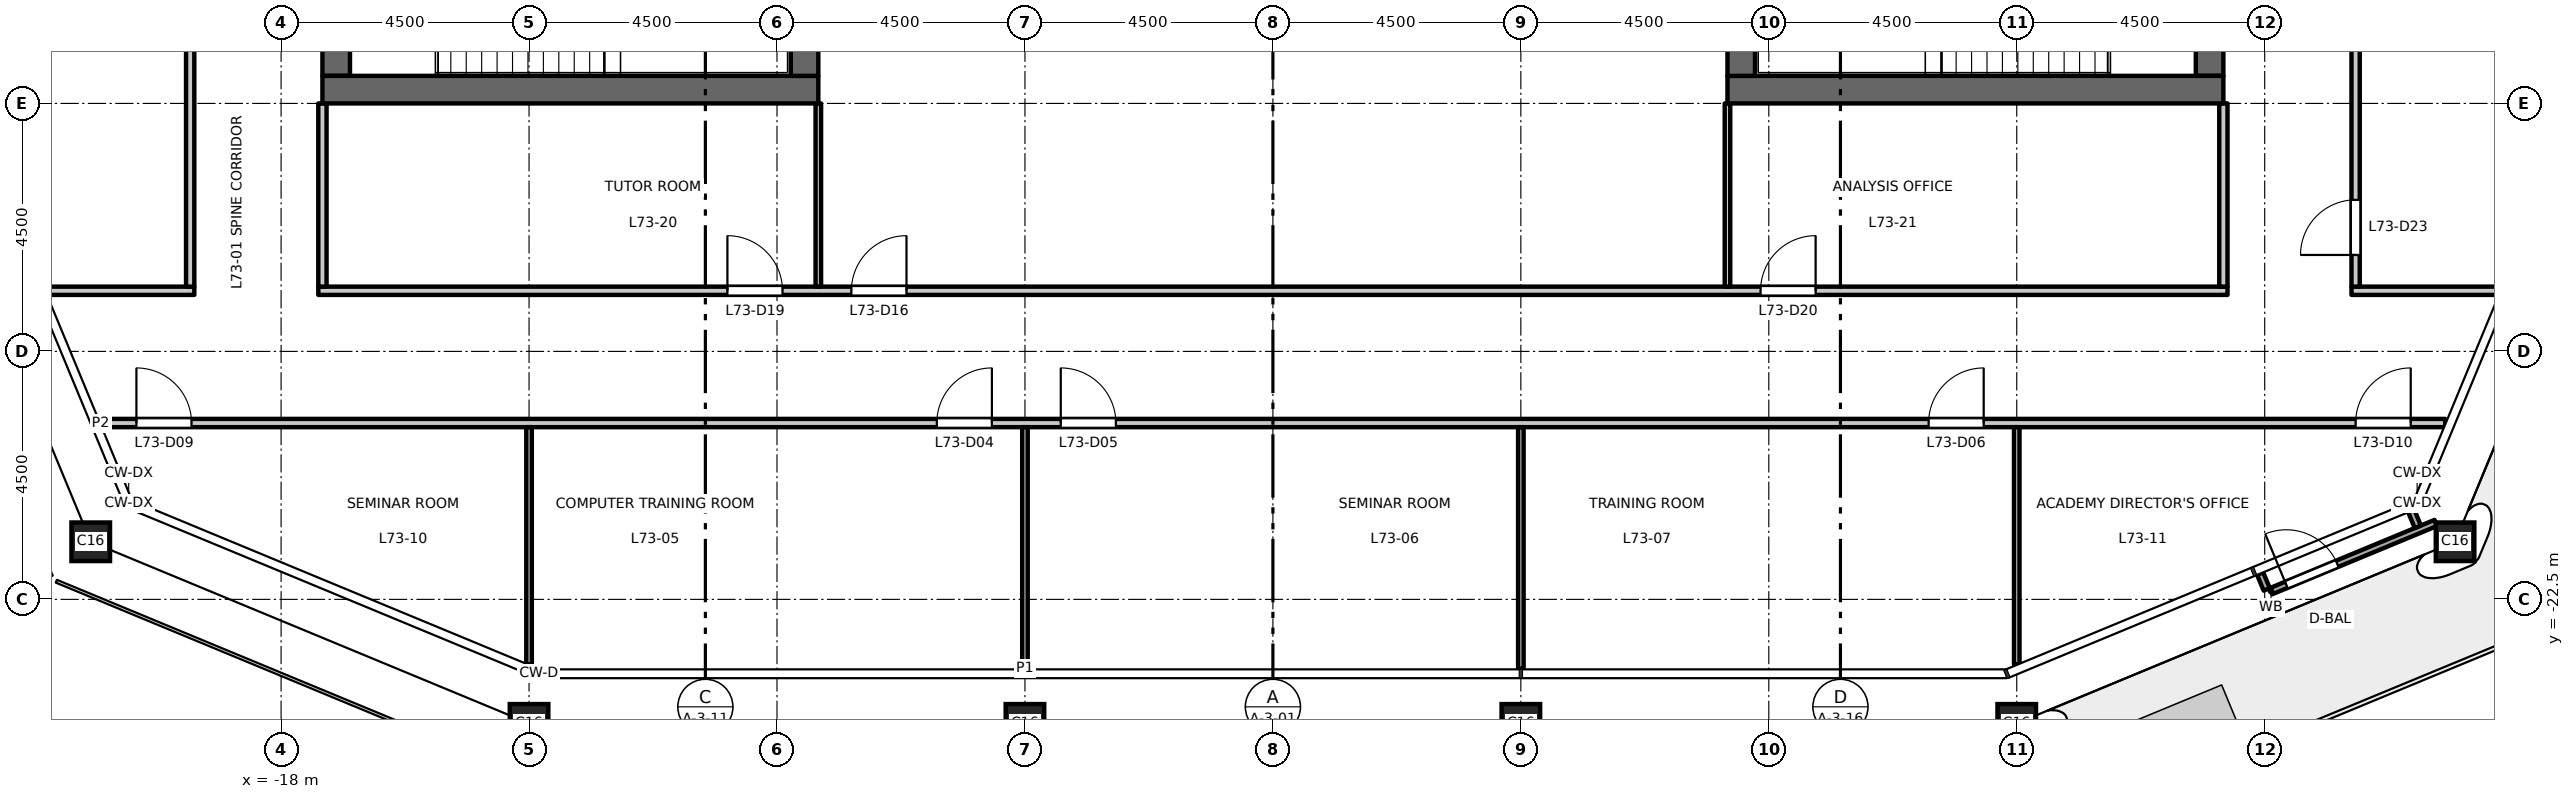
"""IFC4 building model, lengths in metres.
Left out: names, types, materials, properties, quantities, classifications, styles, units other than length and angle.
Written with IfcOpenShell. Run it as: python <this file> out.ifc"""

import sys

from ifc_helpers import new_model, si_unit, direction, frame, frame_2d, origin, origin_2d, place, context, subcontext, project, spatial, rectangle, hollow_rectangle, extrude, element, fill, save


model = new_model("IFC4")
c1 = context("Model", 3, precision=1e-05, world=origin(), true_north=direction((0.0, 1.0)))
c2 = subcontext(c1, "Body", "Model", "MODEL_VIEW")
j1 = project(units=[si_unit("LENGTHUNIT", "METRE"), si_unit("PLANEANGLEUNIT", "RADIAN")], contexts=[c1])
p1 = place(None, origin())
s1 = spatial("IfcSite", under=j1, at=p1, CompositionType="ELEMENT")
p2 = place(p1, origin())
s2 = spatial("IfcBuilding", under=s1, at=p2, CompositionType="ELEMENT")
p3 = place(p2, frame((0.0, 0.0, 339.2)))
s3 = spatial("IfcBuildingStorey", under=s2, at=p3, CompositionType="ELEMENT", Elevation=339.2)
for number, where, z_axis, x_axis in (
    (1, (-13.5, -24.75, 0.0), (0.0, 0.0, 1.0), (1.0, 0.0, 0.0)),
    (2, (-4.5, -24.75, 0.0), (0.0, 0.0, 1.0), (1.0, 0.0, 0.0)),
    (3, (4.5, -24.75, 0.0), (0.0, 0.0, 1.0), (1.0, 0.0, 0.0)),
    (4, (13.5, -24.75, 0.0), (0.0, 0.0, 1.0), (1.0, 0.0, 0.0)),
    (5, (21.455, -21.455, 0.0), (0.0, 0.0, 1.0), (1.0, 0.0, 0.0)),
    (6, (-21.455, -21.455, 0.0), (0.0, 0.0, 1.0), (1.0, 0.0, 0.0)),
):
    element("IfcColumn", number, at=place(p3, frame(where, z_axis=z_axis, x_axis=x_axis)), inside=s3, PredefinedType="COLUMN", context=c2, shape_type="SweptSolid", body=[
        extrude(hollow_rectangle(XDim=0.7, YDim=0.7, WallThickness=0.036, at=origin_2d()), origin(), (0.0, 0.0, 1.0), 4.5),
    ])
p4 = place(p3, frame((-17.0, -13.0, 0.0), z_axis=(0.0, 0.0, 1.0), x_axis=(0.0, 1.0, 0.0)))
e7 = element("IfcWall", 7, at=p4, inside=s3, PredefinedType="SHEAR", context=c2, shape_type="SweptSolid", body=[
    extrude(rectangle(XDim=26.0, YDim=0.5, at=frame_2d((13.0, 0.0))), origin(), (0.0, 0.0, 1.0), 4.35),
])
p5 = place(p4, frame((16.825, 0.0, 0.0)))
e8 = element("IfcOpeningElement", 8, at=p5, cuts=e7, PredefinedType="OPENING", context=c2, shape_type="SweptSolid", body=[
    extrude(rectangle(XDim=1.8, YDim=2.1, at=frame_2d((0.9, 1.05))), frame((0.0, 0.26, 0.0), z_axis=(0.0, -1.0, 0.0), x_axis=(1.0, 0.0, 0.0)), (0.0, 0.0, 1.0), 0.52),
])
p6 = place(p4, frame((7.375, 0.0, 0.0)))
e9 = element("IfcOpeningElement", 9, at=p6, cuts=e7, PredefinedType="OPENING", context=c2, shape_type="SweptSolid", body=[
    extrude(rectangle(XDim=1.8, YDim=2.1, at=frame_2d((0.9, 1.05))), frame((0.0, 0.26, 0.0), z_axis=(0.0, -1.0, 0.0), x_axis=(1.0, 0.0, 0.0)), (0.0, 0.0, 1.0), 0.52),
])
p7 = place(p3, frame((-8.25, -13.25, 0.0), z_axis=(0.0, 0.0, 1.0), x_axis=(-1.0, 0.0, 0.0)))
e10 = element("IfcWall", 10, at=p7, inside=s3, PredefinedType="SHEAR", context=c2, shape_type="SweptSolid", body=[
    extrude(rectangle(XDim=9.0, YDim=0.5, at=frame_2d((4.5, 0.0))), origin(), (0.0, 0.0, 1.0), 4.35),
])
p8 = place(p3, frame((-8.5, -13.0, 0.0), z_axis=(0.0, 0.0, 1.0), x_axis=(0.0, 1.0, 0.0)))
e11 = element("IfcWall", 11, at=p8, inside=s3, PredefinedType="SHEAR", context=c2, shape_type="SweptSolid", body=[
    extrude(rectangle(XDim=26.0, YDim=0.5, at=frame_2d((13.0, 0.0))), origin(), (0.0, 0.0, 1.0), 4.35),
])
p9 = place(p3, frame((17.0, -13.0, 0.0), z_axis=(0.0, 0.0, 1.0), x_axis=(0.0, 1.0, 0.0)))
e12 = element("IfcWall", 12, at=p9, inside=s3, PredefinedType="SHEAR", context=c2, shape_type="SweptSolid", body=[
    extrude(rectangle(XDim=26.0, YDim=0.5, at=frame_2d((13.0, 0.0))), origin(), (0.0, 0.0, 1.0), 4.35),
])
p10 = place(p9, frame((16.825, 0.0, 0.0)))
e13 = element("IfcOpeningElement", 13, at=p10, cuts=e12, PredefinedType="OPENING", context=c2, shape_type="SweptSolid", body=[
    extrude(rectangle(XDim=1.8, YDim=2.1, at=frame_2d((0.9, 1.05))), frame((0.0, 0.26, 0.0), z_axis=(0.0, -1.0, 0.0), x_axis=(1.0, 0.0, 0.0)), (0.0, 0.0, 1.0), 0.52),
])
p11 = place(p9, frame((7.375, 0.0, 0.0)))
e14 = element("IfcOpeningElement", 14, at=p11, cuts=e12, PredefinedType="OPENING", context=c2, shape_type="SweptSolid", body=[
    extrude(rectangle(XDim=1.8, YDim=2.1, at=frame_2d((0.9, 1.05))), frame((0.0, 0.26, 0.0), z_axis=(0.0, -1.0, 0.0), x_axis=(1.0, 0.0, 0.0)), (0.0, 0.0, 1.0), 0.52),
])
p12 = place(p3, frame((8.25, -13.25, 0.0), z_axis=(0.0, 0.0, 1.0), x_axis=(1.0, 0.0, 0.0)))
e15 = element("IfcWall", 15, at=p12, inside=s3, PredefinedType="SHEAR", context=c2, shape_type="SweptSolid", body=[
    extrude(rectangle(XDim=9.0, YDim=0.5, at=frame_2d((4.5, 0.0))), origin(), (0.0, 0.0, 1.0), 4.35),
])
p13 = place(p3, frame((8.5, -13.0, 0.0), z_axis=(0.0, 0.0, 1.0), x_axis=(0.0, 1.0, 0.0)))
e16 = element("IfcWall", 16, at=p13, inside=s3, PredefinedType="SHEAR", context=c2, shape_type="SweptSolid", body=[
    extrude(rectangle(XDim=26.0, YDim=0.5, at=frame_2d((13.0, 0.0))), origin(), (0.0, 0.0, 1.0), 4.35),
])
p14 = place(p3, frame((17.917, -22.033, 0.0), z_axis=(0.0, 0.0, 1.0), x_axis=(0.382769136873, -0.923844027884, 0.0)))
e17 = element("IfcWall", 17, at=p14, inside=s3, PredefinedType="STANDARD", context=c2, shape_type="SweptSolid", body=[
    extrude(rectangle(XDim=0.31, YDim=0.12, at=frame_2d((0.155, 0.0))), origin(), (0.0, 0.0, 1.0), 4.35),
])
p15 = place(p3, frame((20.66, -20.896, 0.0), z_axis=(0.0, 0.0, 1.0), x_axis=(0.382490814953, -0.923959293734, 0.0)))
e18 = element("IfcWall", 18, at=p15, inside=s3, PredefinedType="STANDARD", context=c2, shape_type="SweptSolid", body=[
    extrude(rectangle(XDim=0.31, YDim=0.12, at=frame_2d((0.155, 0.0))), origin(), (0.0, 0.0, 1.0), 4.35),
])
p16 = place(p3, frame((18.115, -22.352, 0.0), z_axis=(0.0, 0.0, 1.0), x_axis=(0.923871583709, 0.382702621907, 0.0)))
e19 = element("IfcWall", 19, at=p16, inside=s3, PredefinedType="STANDARD", context=c2, shape_type="SweptSolid", body=[
    extrude(rectangle(XDim=3.237, YDim=0.12, at=frame_2d((1.618, 0.0))), origin(), (0.0, 0.0, 1.0), 4.35),
])
p17 = place(p16, frame((0.3, 0.0, 0.0)))
e20 = element("IfcOpeningElement", 20, at=p17, cuts=e19, PredefinedType="OPENING", context=c2, shape_type="SweptSolid", body=[
    extrude(rectangle(XDim=1.0, YDim=2.4, at=frame_2d((0.5, 1.2))), frame((0.0, 0.07, 0.0), z_axis=(0.0, -1.0, 0.0), x_axis=(1.0, 0.0, 0.0)), (0.0, 0.0, 1.0), 0.14),
])
p18 = place(p3, frame((-21.276, -19.3, 0.0), z_axis=(0.0, 0.0, 1.0), x_axis=(1.0, 0.0, 0.0)))
e21 = element("IfcWall", 21, at=p18, inside=s3, PredefinedType="PARTITIONING", context=c2, shape_type="SweptSolid", body=[
    extrude(rectangle(XDim=42.552, YDim=0.15, at=frame_2d((21.276, 0.0))), origin(), (0.0, 0.0, 1.0), 4.35),
])
p19 = place(p18, frame((15.176, 0.0, 0.0)))
e22 = element("IfcOpeningElement", 22, at=p19, cuts=e21, PredefinedType="OPENING", context=c2, shape_type="SweptSolid", body=[
    extrude(rectangle(XDim=1.0, YDim=2.1, at=frame_2d((0.5, 1.05))), frame((0.0, 0.085, 0.0), z_axis=(0.0, -1.0, 0.0), x_axis=(1.0, 0.0, 0.0)), (0.0, 0.0, 1.0), 0.17),
])
p20 = place(p18, frame((17.426, 0.0, 0.0)))
e23 = element("IfcOpeningElement", 23, at=p20, cuts=e21, PredefinedType="OPENING", context=c2, shape_type="SweptSolid", body=[
    extrude(rectangle(XDim=1.0, YDim=2.1, at=frame_2d((0.5, 1.05))), frame((0.0, 0.085, 0.0), z_axis=(0.0, -1.0, 0.0), x_axis=(1.0, 0.0, 0.0)), (0.0, 0.0, 1.0), 0.17),
])
p21 = place(p18, frame((33.176, 0.0, 0.0)))
e24 = element("IfcOpeningElement", 24, at=p21, cuts=e21, PredefinedType="OPENING", context=c2, shape_type="SweptSolid", body=[
    extrude(rectangle(XDim=1.0, YDim=2.1, at=frame_2d((0.5, 1.05))), frame((0.0, 0.085, 0.0), z_axis=(0.0, -1.0, 0.0), x_axis=(1.0, 0.0, 0.0)), (0.0, 0.0, 1.0), 0.17),
])
p22 = place(p18, frame((0.65, 0.0, 0.0)))
e25 = element("IfcOpeningElement", 25, at=p22, cuts=e21, PredefinedType="OPENING", context=c2, shape_type="SweptSolid", body=[
    extrude(rectangle(XDim=1.0, YDim=2.1, at=frame_2d((0.5, 1.05))), frame((0.0, 0.085, 0.0), z_axis=(0.0, -1.0, 0.0), x_axis=(1.0, 0.0, 0.0)), (0.0, 0.0, 1.0), 0.17),
])
p23 = place(p18, frame((40.926, 0.0, 0.0)))
e26 = element("IfcOpeningElement", 26, at=p23, cuts=e21, PredefinedType="OPENING", context=c2, shape_type="SweptSolid", body=[
    extrude(rectangle(XDim=1.0, YDim=2.1, at=frame_2d((0.5, 1.05))), frame((0.0, 0.085, 0.0), z_axis=(0.0, -1.0, 0.0), x_axis=(1.0, 0.0, 0.0)), (0.0, 0.0, 1.0), 0.17),
])
p24 = place(p3, frame((-22.27, -16.9, 0.0), z_axis=(0.0, 0.0, 1.0), x_axis=(1.0, 0.0, 0.0)))
e27 = element("IfcWall", 27, at=p24, inside=s3, PredefinedType="PARTITIONING", context=c2, shape_type="SweptSolid", body=[
    extrude(rectangle(XDim=2.695, YDim=0.15, at=frame_2d((1.348, 0.0))), origin(), (0.0, 0.0, 1.0), 4.35),
])
p25 = place(p3, frame((-17.325, -16.9, 0.0), z_axis=(0.0, 0.0, 1.0), x_axis=(1.0, 0.0, 0.0)))
e28 = element("IfcWall", 28, at=p25, inside=s3, PredefinedType="PARTITIONING", context=c2, shape_type="SweptSolid", body=[
    extrude(rectangle(XDim=34.65, YDim=0.15, at=frame_2d((17.325, 0.0))), origin(), (0.0, 0.0, 1.0), 4.35),
])
p26 = place(p25, frame((9.675, 0.0, 0.0)))
e29 = element("IfcOpeningElement", 29, at=p26, cuts=e28, PredefinedType="OPENING", context=c2, shape_type="SweptSolid", body=[
    extrude(rectangle(XDim=1.0, YDim=2.1, at=frame_2d((0.5, 1.05))), frame((0.0, 0.085, 0.0), z_axis=(0.0, -1.0, 0.0), x_axis=(1.0, 0.0, 0.0)), (0.0, 0.0, 1.0), 0.17),
])
p27 = place(p25, frame((7.425, 0.0, 0.0)))
e30 = element("IfcOpeningElement", 30, at=p27, cuts=e28, PredefinedType="OPENING", context=c2, shape_type="SweptSolid", body=[
    extrude(rectangle(XDim=1.0, YDim=2.1, at=frame_2d((0.5, 1.05))), frame((0.0, 0.085, 0.0), z_axis=(0.0, -1.0, 0.0), x_axis=(1.0, 0.0, 0.0)), (0.0, 0.0, 1.0), 0.17),
])
p28 = place(p25, frame((26.175, 0.0, 0.0)))
e31 = element("IfcOpeningElement", 31, at=p28, cuts=e28, PredefinedType="OPENING", context=c2, shape_type="SweptSolid", body=[
    extrude(rectangle(XDim=1.0, YDim=2.1, at=frame_2d((0.5, 1.05))), frame((0.0, 0.085, 0.0), z_axis=(0.0, -1.0, 0.0), x_axis=(1.0, 0.0, 0.0)), (0.0, 0.0, 1.0), 0.17),
])
p29 = place(p3, frame((19.575, -16.9, 0.0), z_axis=(0.0, 0.0, 1.0), x_axis=(1.0, 0.0, 0.0)))
e32 = element("IfcWall", 32, at=p29, inside=s3, PredefinedType="PARTITIONING", context=c2, shape_type="SweptSolid", body=[
    extrude(rectangle(XDim=2.695, YDim=0.15, at=frame_2d((1.348, 0.0))), origin(), (0.0, 0.0, 1.0), 4.35),
])
p30 = place(p3, frame((-19.65, -16.825, 0.0), z_axis=(0.0, 0.0, 1.0), x_axis=(0.0, 1.0, 0.0)))
e33 = element("IfcWall", 33, at=p30, inside=s3, PredefinedType="PARTITIONING", context=c2, shape_type="SweptSolid", body=[
    extrude(rectangle(XDim=33.65, YDim=0.15, at=frame_2d((16.825, 0.0))), origin(), (0.0, 0.0, 1.0), 4.35),
])
p31 = place(p30, frame((32.075, 0.0, 0.0)))
e34 = element("IfcOpeningElement", 34, at=p31, cuts=e33, PredefinedType="OPENING", context=c2, shape_type="SweptSolid", body=[
    extrude(rectangle(XDim=1.0, YDim=2.1, at=frame_2d((0.5, 1.05))), frame((0.0, 0.085, 0.0), z_axis=(0.0, -1.0, 0.0), x_axis=(1.0, 0.0, 0.0)), (0.0, 0.0, 1.0), 0.17),
])
p32 = place(p3, frame((-17.25, -16.825, 0.0), z_axis=(0.0, 0.0, 1.0), x_axis=(0.0, 1.0, 0.0)))
e35 = element("IfcWall", 35, at=p32, inside=s3, PredefinedType="PARTITIONING", context=c2, shape_type="SweptSolid", body=[
    extrude(rectangle(XDim=3.325, YDim=0.15, at=frame_2d((1.663, 0.0))), origin(), (0.0, 0.0, 1.0), 4.35),
])
p33 = place(p3, frame((-13.5, -23.678, 0.0), z_axis=(0.0, 0.0, 1.0), x_axis=(0.0, 1.0, 0.0)))
e36 = element("IfcWall", 36, at=p33, inside=s3, PredefinedType="PARTITIONING", context=c2, shape_type="SweptSolid", body=[
    extrude(rectangle(XDim=4.303, YDim=0.1, at=frame_2d((2.151, 0.0))), origin(), (0.0, 0.0, 1.0), 3.75),
])
p34 = place(p3, frame((-8.25, -16.825, 0.0), z_axis=(0.0, 0.0, 1.0), x_axis=(0.0, 1.0, 0.0)))
e37 = element("IfcWall", 37, at=p34, inside=s3, PredefinedType="PARTITIONING", context=c2, shape_type="SweptSolid", body=[
    extrude(rectangle(XDim=3.325, YDim=0.1, at=frame_2d((1.663, 0.0))), origin(), (0.0, 0.0, 1.0), 4.35),
])
for number, where, z_axis, x_axis in (
    (38, (-4.5, -23.76, 0.0), (0.0, 0.0, 1.0), (0.0, 1.0, 0.0)),
    (39, (4.5, -23.76, 0.0), (0.0, 0.0, 1.0), (0.0, 1.0, 0.0)),
):
    element("IfcWall", number, at=place(p3, frame(where, z_axis=z_axis, x_axis=x_axis)), inside=s3, PredefinedType="PARTITIONING", context=c2, shape_type="SweptSolid", body=[
        extrude(rectangle(XDim=4.385, YDim=0.1, at=frame_2d((2.192, 0.0))), origin(), (0.0, 0.0, 1.0), 3.65),
    ])
p35 = place(p3, frame((8.25, -16.825, 0.0), z_axis=(0.0, 0.0, 1.0), x_axis=(0.0, 1.0, 0.0)))
e40 = element("IfcWall", 40, at=p35, inside=s3, PredefinedType="PARTITIONING", context=c2, shape_type="SweptSolid", body=[
    extrude(rectangle(XDim=3.325, YDim=0.1, at=frame_2d((1.663, 0.0))), origin(), (0.0, 0.0, 1.0), 4.35),
])
p36 = place(p3, frame((13.5, -23.678, 0.0), z_axis=(0.0, 0.0, 1.0), x_axis=(0.0, 1.0, 0.0)))
e41 = element("IfcWall", 41, at=p36, inside=s3, PredefinedType="PARTITIONING", context=c2, shape_type="SweptSolid", body=[
    extrude(rectangle(XDim=4.303, YDim=0.1, at=frame_2d((2.151, 0.0))), origin(), (0.0, 0.0, 1.0), 3.75),
])
p37 = place(p3, frame((17.25, -16.825, 0.0), z_axis=(0.0, 0.0, 1.0), x_axis=(0.0, 1.0, 0.0)))
e42 = element("IfcWall", 42, at=p37, inside=s3, PredefinedType="PARTITIONING", context=c2, shape_type="SweptSolid", body=[
    extrude(rectangle(XDim=3.325, YDim=0.15, at=frame_2d((1.663, 0.0))), origin(), (0.0, 0.0, 1.0), 4.35),
])
p38 = place(p3, frame((19.65, -16.825, 0.0), z_axis=(0.0, 0.0, 1.0), x_axis=(0.0, 1.0, 0.0)))
e43 = element("IfcWall", 43, at=p38, inside=s3, PredefinedType="PARTITIONING", context=c2, shape_type="SweptSolid", body=[
    extrude(rectangle(XDim=33.65, YDim=0.15, at=frame_2d((16.825, 0.0))), origin(), (0.0, 0.0, 1.0), 4.35),
])
p39 = place(p38, frame((0.575, 0.0, 0.0)))
e44 = element("IfcOpeningElement", 44, at=p39, cuts=e43, PredefinedType="OPENING", context=c2, shape_type="SweptSolid", body=[
    extrude(rectangle(XDim=1.0, YDim=2.1, at=frame_2d((0.5, 1.05))), frame((0.0, 0.085, 0.0), z_axis=(0.0, -1.0, 0.0), x_axis=(1.0, 0.0, 0.0)), (0.0, 0.0, 1.0), 0.17),
])
p40 = place(p17, origin())
e45 = element("IfcDoor", 45, at=p40, inside=s3, OperationType="SINGLE_SWING_LEFT", PredefinedType="DOOR", context=c2, shape_type="SweptSolid", body=[
    extrude(rectangle(XDim=1.0, YDim=2.4, at=frame_2d((0.5, 1.2))), frame((0.0, 0.025, 0.0), z_axis=(0.0, -1.0, 0.0), x_axis=(1.0, 0.0, 0.0)), (0.0, 0.0, 1.0), 0.05),
])
fill(e20, e45)
p41 = place(p19, origin())
e46 = element("IfcDoor", 46, at=p41, inside=s3, OperationType="SINGLE_SWING_RIGHT", PredefinedType="DOOR", context=c2, shape_type="SweptSolid", body=[
    extrude(rectangle(XDim=1.0, YDim=2.1, at=frame_2d((0.5, 1.05))), frame((0.0, 0.025, 0.0), z_axis=(0.0, -1.0, 0.0), x_axis=(1.0, 0.0, 0.0)), (0.0, 0.0, 1.0), 0.05),
])
fill(e22, e46)
p42 = place(p20, origin())
e47 = element("IfcDoor", 47, at=p42, inside=s3, OperationType="SINGLE_SWING_LEFT", PredefinedType="DOOR", context=c2, shape_type="SweptSolid", body=[
    extrude(rectangle(XDim=1.0, YDim=2.1, at=frame_2d((0.5, 1.05))), frame((0.0, 0.025, 0.0), z_axis=(0.0, -1.0, 0.0), x_axis=(1.0, 0.0, 0.0)), (0.0, 0.0, 1.0), 0.05),
])
fill(e23, e47)
p43 = place(p21, origin())
e48 = element("IfcDoor", 48, at=p43, inside=s3, OperationType="SINGLE_SWING_RIGHT", PredefinedType="DOOR", context=c2, shape_type="SweptSolid", body=[
    extrude(rectangle(XDim=1.0, YDim=2.1, at=frame_2d((0.5, 1.05))), frame((0.0, 0.025, 0.0), z_axis=(0.0, -1.0, 0.0), x_axis=(1.0, 0.0, 0.0)), (0.0, 0.0, 1.0), 0.05),
])
fill(e24, e48)
p44 = place(p22, origin())
e49 = element("IfcDoor", 49, at=p44, inside=s3, OperationType="SINGLE_SWING_LEFT", PredefinedType="DOOR", context=c2, shape_type="SweptSolid", body=[
    extrude(rectangle(XDim=1.0, YDim=2.1, at=frame_2d((0.5, 1.05))), frame((0.0, 0.025, 0.0), z_axis=(0.0, -1.0, 0.0), x_axis=(1.0, 0.0, 0.0)), (0.0, 0.0, 1.0), 0.05),
])
fill(e25, e49)
p45 = place(p23, origin())
e50 = element("IfcDoor", 50, at=p45, inside=s3, OperationType="SINGLE_SWING_RIGHT", PredefinedType="DOOR", context=c2, shape_type="SweptSolid", body=[
    extrude(rectangle(XDim=1.0, YDim=2.1, at=frame_2d((0.5, 1.05))), frame((0.0, 0.025, 0.0), z_axis=(0.0, -1.0, 0.0), x_axis=(1.0, 0.0, 0.0)), (0.0, 0.0, 1.0), 0.05),
])
fill(e26, e50)
p46 = place(p26, origin())
e51 = element("IfcDoor", 51, at=p46, inside=s3, OperationType="SINGLE_SWING_RIGHT", PredefinedType="DOOR", context=c2, shape_type="SweptSolid", body=[
    extrude(rectangle(XDim=1.0, YDim=2.1, at=frame_2d((0.5, 1.05))), frame((0.0, 0.025, 0.0), z_axis=(0.0, -1.0, 0.0), x_axis=(1.0, 0.0, 0.0)), (0.0, 0.0, 1.0), 0.05),
])
fill(e29, e51)
p47 = place(p27, origin())
e52 = element("IfcDoor", 52, at=p47, inside=s3, OperationType="SINGLE_SWING_LEFT", PredefinedType="DOOR", context=c2, shape_type="SweptSolid", body=[
    extrude(rectangle(XDim=1.0, YDim=2.1, at=frame_2d((0.5, 1.05))), frame((0.0, 0.025, 0.0), z_axis=(0.0, -1.0, 0.0), x_axis=(1.0, 0.0, 0.0)), (0.0, 0.0, 1.0), 0.05),
])
fill(e30, e52)
p48 = place(p28, origin())
e53 = element("IfcDoor", 53, at=p48, inside=s3, OperationType="SINGLE_SWING_RIGHT", PredefinedType="DOOR", context=c2, shape_type="SweptSolid", body=[
    extrude(rectangle(XDim=1.0, YDim=2.1, at=frame_2d((0.5, 1.05))), frame((0.0, 0.025, 0.0), z_axis=(0.0, -1.0, 0.0), x_axis=(1.0, 0.0, 0.0)), (0.0, 0.0, 1.0), 0.05),
])
fill(e31, e53)
p49 = place(p39, origin())
e54 = element("IfcDoor", 54, at=p49, inside=s3, OperationType="SINGLE_SWING_LEFT", PredefinedType="DOOR", context=c2, shape_type="SweptSolid", body=[
    extrude(rectangle(XDim=1.0, YDim=2.1, at=frame_2d((0.5, 1.05))), frame((0.0, 0.025, 0.0), z_axis=(0.0, -1.0, 0.0), x_axis=(1.0, 0.0, 0.0)), (0.0, 0.0, 1.0), 0.05),
])
fill(e44, e54)
save(model, sys.argv[1])
